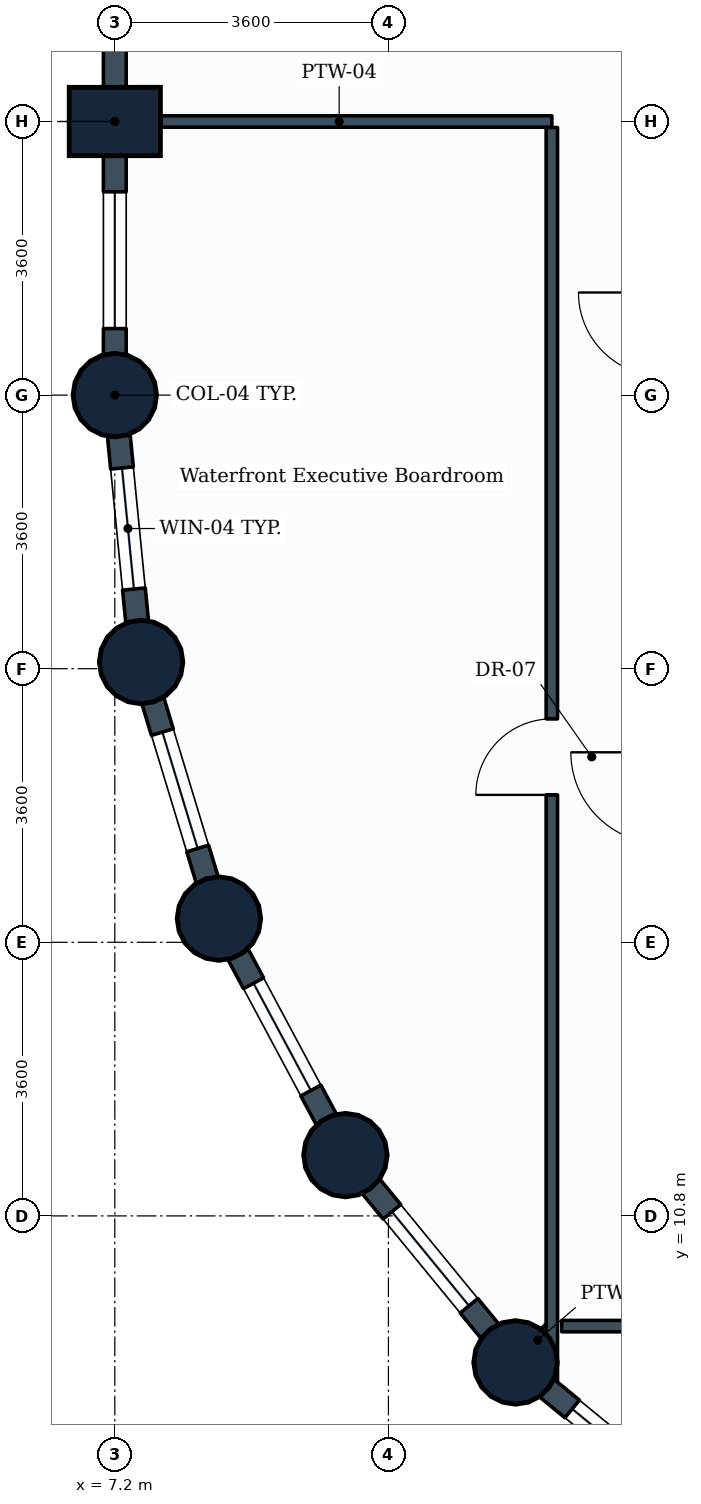
"""IFC4 building model, lengths in metres.
Left out: names, types, materials, properties, quantities, classifications, styles, units other than length and angle.
Written with IfcOpenShell. Run it as: python <this file> out.ifc"""

import sys

from ifc_helpers import new_model, si_unit, direction, frame, frame_2d, origin, origin_2d, place, context, subcontext, project, spatial, rectangle, circle, extrude, element, fill, save


model = new_model("IFC4")
c1 = context("Model", 3, precision=1e-05, world=origin(), true_north=direction((0.0, 1.0)))
c2 = subcontext(c1, "Body", "Model", "MODEL_VIEW")
j1 = project(units=[si_unit("LENGTHUNIT", "METRE"), si_unit("PLANEANGLEUNIT", "RADIAN")], contexts=[c1])
p1 = place(None, origin())
s1 = spatial("IfcSite", under=j1, at=p1, CompositionType="ELEMENT")
p2 = place(p1, origin())
s2 = spatial("IfcBuilding", under=s1, at=p2, CompositionType="ELEMENT")
p3 = place(p2, frame((0.0, 0.0, 31.8)))
s3 = spatial("IfcBuildingStorey", under=s2, at=p3, CompositionType="ELEMENT", Elevation=31.8)
p4 = place(p3, frame((7.2, 21.6, 0.0), z_axis=(0.0, 0.0, 1.0), x_axis=(1.0, 0.0, 0.0)))
e1 = element("IfcColumn", 1, at=p4, inside=s3, PredefinedType="COLUMN", context=c2, shape_type="SweptSolid", body=[
    extrude(circle(Radius=0.55, at=origin_2d()), origin(), (0.0, 0.0, 1.0), 3.9),
])
p5 = place(p3, frame((7.2, 25.2, 0.0), z_axis=(0.0, 0.0, 1.0), x_axis=(0.0, 1.0, 0.0)))
e2 = element("IfcColumn", 2, at=p5, inside=s3, PredefinedType="COLUMN", context=c2, shape_type="SweptSolid", body=[
    extrude(rectangle(XDim=0.9, YDim=1.2, at=origin_2d()), origin(), (0.0, 0.0, 1.0), 3.9),
])
for number, where, z_axis, x_axis in (
    (3, (7.546, 18.088, 0.0), (0.0, 0.0, 1.0), (1.0, 0.0, 0.0)),
    (4, (8.57, 14.712, 0.0), (0.0, 0.0, 1.0), (1.0, 0.0, 0.0)),
    (5, (10.234, 11.6, 0.0), (0.0, 0.0, 1.0), (1.0, 0.0, 0.0)),
    (6, (12.472, 8.872, 0.0), (0.0, 0.0, 1.0), (1.0, 0.0, 0.0)),
):
    element("IfcColumn", number, at=place(p3, frame(where, z_axis=z_axis, x_axis=x_axis)), inside=s3, PredefinedType="COLUMN", context=c2, shape_type="SweptSolid", body=[
        extrude(circle(Radius=0.55, at=origin_2d()), origin(), (0.0, 0.0, 1.0), 3.9),
    ])
p6 = place(p3, frame((7.2, 25.2, 0.0), z_axis=(0.0, 0.0, 1.0), x_axis=(0.0, 1.0, 0.0)))
e7 = element("IfcWall", 7, at=p6, inside=s3, PredefinedType="STANDARD", context=c2, shape_type="SweptSolid", body=[
    extrude(rectangle(XDim=3.6, YDim=0.3, at=frame_2d((1.8, 0.0))), origin(), (0.0, 0.0, 1.0), 2.93),
])
p7 = place(p3, frame((7.2, 21.6, 0.0), z_axis=(0.0, 0.0, 1.0), x_axis=(0.0, 1.0, 0.0)))
e8 = element("IfcWall", 8, at=p7, inside=s3, PredefinedType="STANDARD", context=c2, shape_type="SweptSolid", body=[
    extrude(rectangle(XDim=3.6, YDim=0.3, at=frame_2d((1.8, 0.0))), origin(), (0.0, 0.0, 1.0), 2.93),
])
p8 = place(p7, frame((0.875, 0.0, 0.85)))
e9 = element("IfcOpeningElement", 9, at=p8, cuts=e8, PredefinedType="OPENING", context=c2, shape_type="SweptSolid", body=[
    extrude(rectangle(XDim=1.8, YDim=1.35, at=frame_2d((0.9, 0.675))), frame((0.0, 0.16, 0.0), z_axis=(0.0, -1.0, 0.0), x_axis=(1.0, 0.0, 0.0)), (0.0, 0.0, 1.0), 0.32),
])
p9 = place(p3, frame((7.546, 18.088, 0.0), z_axis=(0.0, 0.0, 1.0), x_axis=(-0.09802417461, 0.995184033831, 0.0)))
e10 = element("IfcWall", 10, at=p9, inside=s3, PredefinedType="STANDARD", context=c2, shape_type="SweptSolid", body=[
    extrude(rectangle(XDim=3.529, YDim=0.3, at=frame_2d((1.765, 0.0))), origin(), (0.0, 0.0, 1.0), 2.93),
])
p10 = place(p9, frame((0.965, 0.0, 0.85)))
e11 = element("IfcOpeningElement", 11, at=p10, cuts=e10, PredefinedType="OPENING", context=c2, shape_type="SweptSolid", body=[
    extrude(rectangle(XDim=1.6, YDim=1.35, at=frame_2d((0.8, 0.675))), frame((0.0, 0.16, 0.0), z_axis=(0.0, -1.0, 0.0), x_axis=(1.0, 0.0, 0.0)), (0.0, 0.0, 1.0), 0.32),
])
p11 = place(p3, frame((8.57, 14.712, 0.0), z_axis=(0.0, 0.0, 1.0), x_axis=(-0.290305086481, 0.956934144423, 0.0)))
e12 = element("IfcWall", 12, at=p11, inside=s3, PredefinedType="STANDARD", context=c2, shape_type="SweptSolid", body=[
    extrude(rectangle(XDim=3.528, YDim=0.3, at=frame_2d((1.764, 0.0))), origin(), (0.0, 0.0, 1.0), 2.93),
])
p12 = place(p11, frame((0.964, 0.0, 0.85)))
e13 = element("IfcOpeningElement", 13, at=p12, cuts=e12, PredefinedType="OPENING", context=c2, shape_type="SweptSolid", body=[
    extrude(rectangle(XDim=1.6, YDim=1.35, at=frame_2d((0.8, 0.675))), frame((0.0, 0.16, 0.0), z_axis=(0.0, -1.0, 0.0), x_axis=(1.0, 0.0, 0.0)), (0.0, 0.0, 1.0), 0.32),
])
p13 = place(p3, frame((10.234, 11.6, 0.0), z_axis=(0.0, 0.0, 1.0), x_axis=(-0.47151087309, 0.881860247748, 0.0)))
e14 = element("IfcWall", 14, at=p13, inside=s3, PredefinedType="STANDARD", context=c2, shape_type="SweptSolid", body=[
    extrude(rectangle(XDim=3.529, YDim=0.3, at=frame_2d((1.764, 0.0))), origin(), (0.0, 0.0, 1.0), 2.93),
])
p14 = place(p13, frame((0.964, 0.0, 0.85)))
e15 = element("IfcOpeningElement", 15, at=p14, cuts=e14, PredefinedType="OPENING", context=c2, shape_type="SweptSolid", body=[
    extrude(rectangle(XDim=1.6, YDim=1.35, at=frame_2d((0.8, 0.675))), frame((0.0, 0.16, 0.0), z_axis=(0.0, -1.0, 0.0), x_axis=(1.0, 0.0, 0.0)), (0.0, 0.0, 1.0), 0.32),
])
p15 = place(p3, frame((12.472, 8.872, 0.0), z_axis=(0.0, 0.0, 1.0), x_axis=(-0.634258295121, 0.773121216285, 0.0)))
e16 = element("IfcWall", 16, at=p15, inside=s3, PredefinedType="STANDARD", context=c2, shape_type="SweptSolid", body=[
    extrude(rectangle(XDim=3.529, YDim=0.3, at=frame_2d((1.764, 0.0))), origin(), (0.0, 0.0, 1.0), 2.93),
])
p16 = place(p15, frame((0.964, 0.0, 0.85)))
e17 = element("IfcOpeningElement", 17, at=p16, cuts=e16, PredefinedType="OPENING", context=c2, shape_type="SweptSolid", body=[
    extrude(rectangle(XDim=1.6, YDim=1.35, at=frame_2d((0.8, 0.675))), frame((0.0, 0.16, 0.0), z_axis=(0.0, -1.0, 0.0), x_axis=(1.0, 0.0, 0.0)), (0.0, 0.0, 1.0), 0.32),
])
p17 = place(p3, frame((15.2, 6.634, 0.0), z_axis=(0.0, 0.0, 1.0), x_axis=(-0.773121216285, 0.634258295121, 0.0)))
e18 = element("IfcWall", 18, at=p17, inside=s3, PredefinedType="STANDARD", context=c2, shape_type="SweptSolid", body=[
    extrude(rectangle(XDim=3.529, YDim=0.3, at=frame_2d((1.764, 0.0))), origin(), (0.0, 0.0, 1.0), 2.93),
])
p18 = place(p17, frame((0.964, 0.0, 0.85)))
e19 = element("IfcOpeningElement", 19, at=p18, cuts=e18, PredefinedType="OPENING", context=c2, shape_type="SweptSolid", body=[
    extrude(rectangle(XDim=1.6, YDim=1.35, at=frame_2d((0.8, 0.675))), frame((0.0, 0.16, 0.0), z_axis=(0.0, -1.0, 0.0), x_axis=(1.0, 0.0, 0.0)), (0.0, 0.0, 1.0), 0.32),
])
p19 = place(p3, frame((7.354, 25.2, 0.0), z_axis=(0.0, 0.0, 1.0), x_axis=(1.0, 0.0, 0.0)))
e20 = element("IfcWall", 20, at=p19, inside=s3, PredefinedType="PARTITIONING", context=c2, shape_type="SweptSolid", body=[
    extrude(rectangle(XDim=5.596, YDim=0.15, at=frame_2d((2.798, 0.0))), origin(), (0.0, 0.0, 1.0), 3.635),
])
p20 = place(p3, frame((12.95, 9.35, 0.0), z_axis=(0.0, 0.0, 1.0), x_axis=(-0.707106781187, -0.707106781187, 0.0)))
e21 = element("IfcWall", 21, at=p20, inside=s3, PredefinedType="PARTITIONING", context=c2, shape_type="SweptSolid", body=[
    extrude(rectangle(XDim=0.522, YDim=0.15, at=frame_2d((0.261, 0.0))), origin(), (0.0, 0.0, 1.0), 3.08),
])
p21 = place(p3, frame((12.95, 8.634, 0.0), z_axis=(0.0, 0.0, 1.0), x_axis=(0.0, 1.0, 0.0)))
e22 = element("IfcWall", 22, at=p21, inside=s3, PredefinedType="PARTITIONING", context=c2, shape_type="SweptSolid", body=[
    extrude(rectangle(XDim=16.487, YDim=0.15, at=frame_2d((8.244, 0.0))), origin(), (0.0, 0.0, 1.0), 2.93),
])
p22 = place(p21, frame((7.706, 0.0, 0.0)))
e23 = element("IfcOpeningElement", 23, at=p22, cuts=e22, PredefinedType="OPENING", context=c2, shape_type="SweptSolid", body=[
    extrude(rectangle(XDim=1.0, YDim=2.1, at=frame_2d((0.5, 1.05))), frame((0.0, 0.085, 0.0), z_axis=(0.0, -1.0, 0.0), x_axis=(1.0, 0.0, 0.0)), (0.0, 0.0, 1.0), 0.17),
])
p23 = place(p3, frame((13.08, 9.35, 0.0), z_axis=(0.0, 0.0, 1.0), x_axis=(1.0, 0.0, 0.0)))
e24 = element("IfcWall", 24, at=p23, inside=s3, PredefinedType="PARTITIONING", context=c2, shape_type="SweptSolid", body=[
    extrude(rectangle(XDim=15.641, YDim=0.15, at=frame_2d((7.82, 0.0))), origin(), (0.0, 0.0, 1.0), 3.04),
])
p24 = place(p23, frame((4.706, 0.0, 0.0)))
e25 = element("IfcOpeningElement", 25, at=p24, cuts=e24, PredefinedType="OPENING", context=c2, shape_type="SweptSolid", body=[
    extrude(rectangle(XDim=1.0, YDim=2.1, at=frame_2d((0.5, 1.05))), frame((0.0, 0.085, 0.0), z_axis=(0.0, -1.0, 0.0), x_axis=(1.0, 0.0, 0.0)), (0.0, 0.0, 1.0), 0.17),
])
p25 = place(p8, origin())
e26 = element("IfcWindow", 26, at=p25, inside=s3, PartitioningType="SINGLE_PANEL", PredefinedType="WINDOW", context=c2, shape_type="SweptSolid", body=[
    extrude(rectangle(XDim=1.8, YDim=1.35, at=frame_2d((0.9, 0.675))), frame((0.0, 0.03, 0.0), z_axis=(0.0, -1.0, 0.0), x_axis=(1.0, 0.0, 0.0)), (0.0, 0.0, 1.0), 0.06),
])
fill(e9, e26)
p26 = place(p10, origin())
e27 = element("IfcWindow", 27, at=p26, inside=s3, PartitioningType="SINGLE_PANEL", PredefinedType="WINDOW", context=c2, shape_type="SweptSolid", body=[
    extrude(rectangle(XDim=1.6, YDim=1.35, at=frame_2d((0.8, 0.675))), frame((0.0, 0.03, 0.0), z_axis=(0.0, -1.0, 0.0), x_axis=(1.0, 0.0, 0.0)), (0.0, 0.0, 1.0), 0.06),
])
fill(e11, e27)
p27 = place(p12, origin())
e28 = element("IfcWindow", 28, at=p27, inside=s3, PartitioningType="SINGLE_PANEL", PredefinedType="WINDOW", context=c2, shape_type="SweptSolid", body=[
    extrude(rectangle(XDim=1.6, YDim=1.35, at=frame_2d((0.8, 0.675))), frame((0.0, 0.03, 0.0), z_axis=(0.0, -1.0, 0.0), x_axis=(1.0, 0.0, 0.0)), (0.0, 0.0, 1.0), 0.06),
])
fill(e13, e28)
p28 = place(p14, origin())
e29 = element("IfcWindow", 29, at=p28, inside=s3, PartitioningType="SINGLE_PANEL", PredefinedType="WINDOW", context=c2, shape_type="SweptSolid", body=[
    extrude(rectangle(XDim=1.6, YDim=1.35, at=frame_2d((0.8, 0.675))), frame((0.0, 0.03, 0.0), z_axis=(0.0, -1.0, 0.0), x_axis=(1.0, 0.0, 0.0)), (0.0, 0.0, 1.0), 0.06),
])
fill(e15, e29)
p29 = place(p16, origin())
e30 = element("IfcWindow", 30, at=p29, inside=s3, PartitioningType="SINGLE_PANEL", PredefinedType="WINDOW", context=c2, shape_type="SweptSolid", body=[
    extrude(rectangle(XDim=1.6, YDim=1.35, at=frame_2d((0.8, 0.675))), frame((0.0, 0.03, 0.0), z_axis=(0.0, -1.0, 0.0), x_axis=(1.0, 0.0, 0.0)), (0.0, 0.0, 1.0), 0.06),
])
fill(e17, e30)
p30 = place(p18, origin())
e31 = element("IfcWindow", 31, at=p30, inside=s3, PartitioningType="SINGLE_PANEL", PredefinedType="WINDOW", context=c2, shape_type="SweptSolid", body=[
    extrude(rectangle(XDim=1.6, YDim=1.35, at=frame_2d((0.8, 0.675))), frame((0.0, 0.03, 0.0), z_axis=(0.0, -1.0, 0.0), x_axis=(1.0, 0.0, 0.0)), (0.0, 0.0, 1.0), 0.06),
])
fill(e19, e31)
p31 = place(p22, origin())
e32 = element("IfcDoor", 32, at=p31, inside=s3, OperationType="SINGLE_SWING_LEFT", PredefinedType="DOOR", context=c2, shape_type="SweptSolid", body=[
    extrude(rectangle(XDim=1.0, YDim=2.1, at=frame_2d((0.5, 1.05))), frame((0.0, 0.025, 0.0), z_axis=(0.0, -1.0, 0.0), x_axis=(1.0, 0.0, 0.0)), (0.0, 0.0, 1.0), 0.05),
])
fill(e23, e32)
save(model, sys.argv[1])
